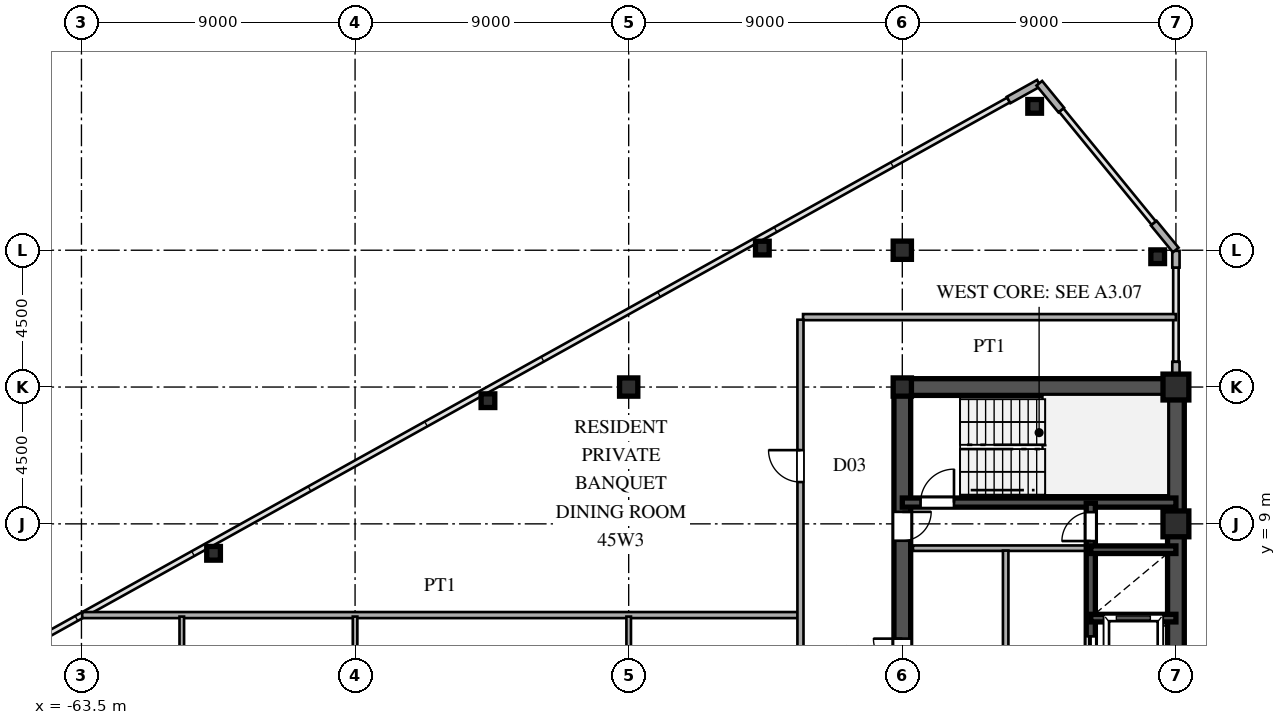
"""IFC4 building model, lengths in metres.
Left out: names, types, materials, properties, quantities, classifications, styles, units other than length and angle.
Written with IfcOpenShell. Run it as: python <this file> out.ifc"""

import sys

from ifc_helpers import new_model, si_unit, direction, frame, frame_2d, origin, origin_2d, place, context, subcontext, project, spatial, rectangle, hollow_rectangle, i_section, extrude, source, transform, mapped, element, fill, save


model = new_model("IFC4")
c1 = context("Model", 3, precision=1e-05, world=origin(), true_north=direction((0.0, 1.0)))
c2 = subcontext(c1, "Body", "Model", "MODEL_VIEW")
j1 = project(units=[si_unit("LENGTHUNIT", "METRE"), si_unit("PLANEANGLEUNIT", "RADIAN")], contexts=[c1])
p1 = place(None, origin())
s1 = spatial("IfcSite", under=j1, at=p1, CompositionType="ELEMENT")
p2 = place(p1, origin())
s2 = spatial("IfcBuilding", under=s1, at=p2, CompositionType="ELEMENT")
p3 = place(p2, frame((0.0, 0.0, 170.7)))
s3 = spatial("IfcBuildingStorey", under=s2, at=p3, CompositionType="ELEMENT", Elevation=170.7)
m1 = source(origin(), c2, "Body", "SweptSolid", [
    extrude(hollow_rectangle(XDim=0.85, YDim=0.85, WallThickness=0.036, at=origin_2d()), origin(), (0.0, 0.0, 1.0), 3.6),
])
for number, where, z_axis, x_axis in (
    (1, (-27.5, 9.0, 0.0), (0.0, 0.0, 1.0), (1.0, 0.0, 0.0)),
    (2, (-27.5, 13.5, 0.0), (0.0, 0.0, 1.0), (1.0, 0.0, 0.0)),
):
    element("IfcColumn", number, at=place(p3, frame(where, z_axis=z_axis, x_axis=x_axis)), inside=s3, PredefinedType="COLUMN", context=c2, shape_type="MappedRepresentation", body=[
        mapped(m1, transform((0.0, 0.0, 0.0), scale=1.0)),
    ])
m2 = source(origin(), c2, "Body", "SweptSolid", [
    extrude(i_section(OverallWidth=0.6, OverallDepth=0.6, WebThickness=0.025, FlangeThickness=0.04, at=origin_2d()), origin(), (0.0, 0.0, 1.0), 3.6),
])
for number, where, z_axis, x_axis in (
    (3, (-36.5, 13.5, 0.0), (0.0, 0.0, 1.0), (1.0, 0.0, 0.0)),
    (4, (-36.5, 18.0, 0.0), (0.0, 0.0, 1.0), (1.0, 0.0, 0.0)),
    (5, (-45.5, 13.5, 0.0), (0.0, 0.0, 1.0), (1.0, 0.0, 0.0)),
):
    element("IfcColumn", number, at=place(p3, frame(where, z_axis=z_axis, x_axis=x_axis)), inside=s3, PredefinedType="COLUMN", context=c2, shape_type="MappedRepresentation", body=[
        mapped(m2, transform((0.0, 0.0, 0.0), scale=1.0)),
    ])
m3 = source(origin(), c2, "Body", "SweptSolid", [
    extrude(hollow_rectangle(XDim=0.45, YDim=0.45, WallThickness=0.018, at=origin_2d()), origin(), (0.0, 0.0, 1.0), 3.6),
])
for number, where, z_axis, x_axis in (
    (6, (-28.1, 17.786, 0.0), (0.0, 0.0, 1.0), (1.0, 0.0, 0.0)),
    (7, (-32.147, 22.732, 0.0), (0.0, 0.0, 1.0), (1.0, 0.0, 0.0)),
    (8, (-41.104, 18.071, 0.0), (0.0, 0.0, 1.0), (1.0, 0.0, 0.0)),
    (9, (-50.129, 13.051, 0.0), (0.0, 0.0, 1.0), (1.0, 0.0, 0.0)),
    (10, (-59.155, 8.031, 0.0), (0.0, 0.0, 1.0), (1.0, 0.0, 0.0)),
):
    element("IfcColumn", number, at=place(p3, frame(where, z_axis=z_axis, x_axis=x_axis)), inside=s3, PredefinedType="COLUMN", context=c2, shape_type="MappedRepresentation", body=[
        mapped(m3, transform((0.0, 0.0, 0.0), scale=1.0)),
    ])
p4 = place(p3, frame((-27.5, 13.78, 0.0), z_axis=(0.0, 0.0, 1.0), x_axis=(0.0, 1.0, 0.0)))
e11 = element("IfcWall", 11, at=p4, inside=s3, PredefinedType="SOLIDWALL", context=c2, shape_type="SweptSolid", body=[
    extrude(rectangle(XDim=0.55, YDim=0.24, at=frame_2d((0.275, 0.0))), origin(), (0.0, 0.0, 1.0), 2.88),
])
p5 = place(p3, frame((-27.5, 17.43, 0.0), z_axis=(0.0, 0.0, 1.0), x_axis=(0.0, 1.0, 0.0)))
e12 = element("IfcWall", 12, at=p5, inside=s3, PredefinedType="SOLIDWALL", context=c2, shape_type="SweptSolid", body=[
    extrude(rectangle(XDim=0.55, YDim=0.24, at=frame_2d((0.275, 0.0))), origin(), (0.0, 0.0, 1.0), 3.38),
])
for number, where, z_axis, x_axis in (
    (13, (-27.506, 18.008, 0.0), (0.0, 0.0, 1.0), (-0.633, 0.774, 0.0)),
    (14, (-31.272, 22.61, 0.0), (0.0, 0.0, 1.0), (-0.633, 0.774, 0.0)),
):
    element("IfcWall", number, at=place(p3, frame(where, z_axis=z_axis, x_axis=x_axis)), inside=s3, PredefinedType="SOLIDWALL", context=c2, shape_type="SweptSolid", body=[
        extrude(rectangle(XDim=1.14, YDim=0.24, at=frame_2d((0.57, 0.0))), origin(), (0.0, 0.0, 1.0), 3.38),
    ])
p6 = place(p3, frame((-32.009, 23.495, 0.0), z_axis=(0.0, 0.0, 1.0), x_axis=(-0.87385402111, -0.486188389196, 0.0)))
e15 = element("IfcWall", 15, at=p6, inside=s3, PredefinedType="SOLIDWALL", context=c2, shape_type="SweptSolid", body=[
    extrude(rectangle(XDim=1.14, YDim=0.24, at=frame_2d((0.57, 0.0))), origin(), (0.0, 0.0, 1.0), 3.38),
])
p7 = place(p3, frame((-27.5, 1.3, 0.0), z_axis=(0.0, 0.0, 1.0), x_axis=(0.0, 1.0, 0.0)))
e16 = element("IfcWall", 16, at=p7, inside=s3, PredefinedType="SHEAR", context=c2, shape_type="SweptSolid", body=[
    extrude(rectangle(XDim=12.2, YDim=0.55, at=frame_2d((6.1, 0.0))), origin(), (0.0, 0.0, 1.0), 3.38),
])
p8 = place(p3, frame((-36.5, 13.5, 0.0), z_axis=(0.0, 0.0, 1.0), x_axis=(1.0, 0.0, 0.0)))
e17 = element("IfcWall", 17, at=p8, inside=s3, PredefinedType="SHEAR", context=c2, shape_type="SweptSolid", body=[
    extrude(rectangle(XDim=9.0, YDim=0.55, at=frame_2d((4.5, 0.0))), origin(), (0.0, 0.0, 1.0), 3.38),
])
p9 = place(p3, frame((-36.5, 8.2, 0.0), z_axis=(0.0, 0.0, 1.0), x_axis=(0.0, 1.0, 0.0)))
e18 = element("IfcWall", 18, at=p9, inside=s3, PredefinedType="SHEAR", context=c2, shape_type="SweptSolid", body=[
    extrude(rectangle(XDim=5.45, YDim=0.55, at=frame_2d((2.725, 0.0))), origin(), (0.0, 0.0, 1.0), 3.38),
])
p10 = place(p9, frame((0.245, 0.0, 0.0)))
e19 = element("IfcOpeningElement", 19, at=p10, cuts=e18, PredefinedType="OPENING", context=c2, shape_type="SweptSolid", body=[
    extrude(rectangle(XDim=0.95, YDim=2.15, at=frame_2d((0.475, 1.075))), frame((0.0, 0.285, 0.0), z_axis=(0.0, -1.0, 0.0), x_axis=(1.0, 0.0, 0.0)), (0.0, 0.0, 1.0), 0.57),
])
p11 = place(p3, frame((-36.5, 1.3, 0.0), z_axis=(0.0, 0.0, 1.0), x_axis=(0.0, 1.0, 0.0)))
e20 = element("IfcWall", 20, at=p11, inside=s3, PredefinedType="SHEAR", context=c2, shape_type="SweptSolid", body=[
    extrude(rectangle(XDim=6.9, YDim=0.55, at=frame_2d((3.45, 0.0))), origin(), (0.0, 0.0, 1.0), 3.38),
])
p12 = place(p11, frame((2.975, 0.0, 0.0)))
e21 = element("IfcOpeningElement", 21, at=p12, cuts=e20, PredefinedType="OPENING", context=c2, shape_type="SweptSolid", body=[
    extrude(rectangle(XDim=0.95, YDim=2.15, at=frame_2d((0.475, 1.075))), frame((0.0, 0.285, 0.0), z_axis=(0.0, -1.0, 0.0), x_axis=(1.0, 0.0, 0.0)), (0.0, 0.0, 1.0), 0.57),
])
p13 = place(p3, frame((-36.5, 9.7, 0.0), z_axis=(0.0, 0.0, 1.0), x_axis=(1.0, 0.0, 0.0)))
e22 = element("IfcWall", 22, at=p13, inside=s3, PredefinedType="SHEAR", context=c2, shape_type="SweptSolid", body=[
    extrude(rectangle(XDim=9.0, YDim=0.3, at=frame_2d((4.5, 0.0))), origin(), (0.0, 0.0, 1.0), 3.38),
])
p14 = place(p13, frame((0.6, 0.0, 0.0)))
e23 = element("IfcOpeningElement", 23, at=p14, cuts=e22, PredefinedType="OPENING", context=c2, shape_type="SweptSolid", body=[
    extrude(rectangle(XDim=1.1, YDim=2.2, at=frame_2d((0.55, 1.1))), frame((0.0, 0.16, 0.0), z_axis=(0.0, -1.0, 0.0), x_axis=(1.0, 0.0, 0.0)), (0.0, 0.0, 1.0), 0.32),
])
for number, where, z_axis, x_axis in (
    (24, (-30.3, 5.9, 0.0), (0.0, 0.0, 1.0), (1.0, 0.0, 0.0)),
    (25, (-30.3, 8.15, 0.0), (0.0, 0.0, 1.0), (1.0, 0.0, 0.0)),
):
    element("IfcWall", number, at=place(p3, frame(where, z_axis=z_axis, x_axis=x_axis)), inside=s3, PredefinedType="SHEAR", context=c2, shape_type="SweptSolid", body=[
        extrude(rectangle(XDim=2.8, YDim=0.25, at=frame_2d((1.4, 0.0))), origin(), (0.0, 0.0, 1.0), 3.38),
    ])
p15 = place(p3, frame((-30.3, 3.6, 0.0), z_axis=(0.0, 0.0, 1.0), x_axis=(0.0, 1.0, 0.0)))
e26 = element("IfcWall", 26, at=p15, inside=s3, PredefinedType="SHEAR", context=c2, shape_type="SweptSolid", body=[
    extrude(rectangle(XDim=2.3, YDim=0.3, at=frame_2d((1.15, 0.0))), origin(), (0.0, 0.0, 1.0), 3.38),
])
p16 = place(p15, frame((0.6, 0.0, 0.0)))
e27 = element("IfcOpeningElement", 27, at=p16, cuts=e26, PredefinedType="OPENING", context=c2, shape_type="SweptSolid", body=[
    extrude(rectangle(XDim=1.1, YDim=2.2, at=frame_2d((0.55, 1.1))), frame((0.0, 0.16, 0.0), z_axis=(0.0, -1.0, 0.0), x_axis=(1.0, 0.0, 0.0)), (0.0, 0.0, 1.0), 0.32),
])
p17 = place(p3, frame((-30.3, 5.9, 0.0), z_axis=(0.0, 0.0, 1.0), x_axis=(0.0, 1.0, 0.0)))
e28 = element("IfcWall", 28, at=p17, inside=s3, PredefinedType="SHEAR", context=c2, shape_type="SweptSolid", body=[
    extrude(rectangle(XDim=2.25, YDim=0.3, at=frame_2d((1.125, 0.0))), origin(), (0.0, 0.0, 1.0), 3.38),
])
p18 = place(p3, frame((-30.3, 8.15, 0.0), z_axis=(0.0, 0.0, 1.0), x_axis=(0.0, 1.0, 0.0)))
e29 = element("IfcWall", 29, at=p18, inside=s3, PredefinedType="SHEAR", context=c2, shape_type="SweptSolid", body=[
    extrude(rectangle(XDim=1.53, YDim=0.3, at=frame_2d((0.765, 0.0))), origin(), (0.0, 0.0, 1.0), 3.38),
])
p19 = place(p18, frame((0.285, 0.0, 0.0)))
e30 = element("IfcOpeningElement", 30, at=p19, cuts=e29, PredefinedType="OPENING", context=c2, shape_type="SweptSolid", body=[
    extrude(rectangle(XDim=0.95, YDim=2.15, at=frame_2d((0.475, 1.075))), frame((0.0, 0.16, 0.0), z_axis=(0.0, -1.0, 0.0), x_axis=(1.0, 0.0, 0.0)), (0.0, 0.0, 1.0), 0.32),
])
p20 = place(p3, frame((-36.15, 8.2, 0.0), z_axis=(0.0, 0.0, 1.0), x_axis=(1.0, 0.0, 0.0)))
e31 = element("IfcWall", 31, at=p20, inside=s3, PredefinedType="PARTITIONING", context=c2, shape_type="SweptSolid", body=[
    extrude(rectangle(XDim=5.7, YDim=0.18, at=frame_2d((2.85, 0.0))), origin(), (0.0, 0.0, 1.0), 3.38),
])
p21 = place(p3, frame((-33.1, 1.38, 0.0), z_axis=(0.0, 0.0, 1.0), x_axis=(0.0, 1.0, 0.0)))
e32 = element("IfcWall", 32, at=p21, inside=s3, PredefinedType="PARTITIONING", context=c2, shape_type="SweptSolid", body=[
    extrude(rectangle(XDim=6.74, YDim=0.18, at=frame_2d((3.37, 0.0))), origin(), (0.0, 0.0, 1.0), 3.38),
])
p22 = place(p3, frame((-63.476, 6.0, 0.0), z_axis=(0.0, 0.0, 1.0), x_axis=(1.0, 0.0, 0.0)))
e33 = element("IfcWall", 33, at=p22, inside=s3, PredefinedType="PARTITIONING", context=c2, shape_type="SweptSolid", body=[
    extrude(rectangle(XDim=23.546, YDim=0.2, at=frame_2d((11.773, 0.0))), origin(), (0.0, 0.0, 1.0), 3.38),
])
p23 = place(p3, frame((-39.765, 15.8, 0.0), z_axis=(0.0, 0.0, 1.0), x_axis=(1.0, 0.0, 0.0)))
e34 = element("IfcWall", 34, at=p23, inside=s3, PredefinedType="PARTITIONING", context=c2, shape_type="SweptSolid", body=[
    extrude(rectangle(XDim=12.265, YDim=0.2, at=frame_2d((6.132, 0.0))), origin(), (0.0, 0.0, 1.0), 3.38),
])
p24 = place(p3, frame((-60.2, -3.283, 0.0), z_axis=(0.0, 0.0, 1.0), x_axis=(0.0, 1.0, 0.0)))
e35 = element("IfcWall", 35, at=p24, inside=s3, PredefinedType="PARTITIONING", context=c2, shape_type="SweptSolid", body=[
    extrude(rectangle(XDim=9.233, YDim=0.15, at=frame_2d((4.616, 0.0))), origin(), (0.0, 0.0, 1.0), 3.38),
])
p25 = place(p24, frame((1.808, 0.0, 0.0)))
e36 = element("IfcOpeningElement", 36, at=p25, cuts=e35, PredefinedType="OPENING", context=c2, shape_type="SweptSolid", body=[
    extrude(rectangle(XDim=0.95, YDim=2.15, at=frame_2d((0.475, 1.075))), frame((0.0, 0.085, 0.0), z_axis=(0.0, -1.0, 0.0), x_axis=(1.0, 0.0, 0.0)), (0.0, 0.0, 1.0), 0.17),
])
p26 = place(p24, frame((6.475, 0.0, 0.0)))
e37 = element("IfcOpeningElement", 37, at=p26, cuts=e35, PredefinedType="OPENING", context=c2, shape_type="SweptSolid", body=[
    extrude(rectangle(XDim=0.95, YDim=2.15, at=frame_2d((0.475, 1.075))), frame((0.0, 0.085, 0.0), z_axis=(0.0, -1.0, 0.0), x_axis=(1.0, 0.0, 0.0)), (0.0, 0.0, 1.0), 0.17),
])
p27 = place(p3, frame((-54.5, -7.95, 0.0), z_axis=(0.0, 0.0, 1.0), x_axis=(0.0, 1.0, 0.0)))
e38 = element("IfcWall", 38, at=p27, inside=s3, PredefinedType="PARTITIONING", context=c2, shape_type="SweptSolid", body=[
    extrude(rectangle(XDim=13.9, YDim=0.15, at=frame_2d((6.95, 0.0))), origin(), (0.0, 0.0, 1.0), 2.78),
])
p28 = place(p27, frame((6.475, 0.0, 0.0)))
e39 = element("IfcOpeningElement", 39, at=p28, cuts=e38, PredefinedType="OPENING", context=c2, shape_type="SweptSolid", body=[
    extrude(rectangle(XDim=0.95, YDim=2.15, at=frame_2d((0.475, 1.075))), frame((0.0, 0.085, 0.0), z_axis=(0.0, -1.0, 0.0), x_axis=(1.0, 0.0, 0.0)), (0.0, 0.0, 1.0), 0.17),
])
p29 = place(p3, frame((-45.5, 1.852, 0.0), z_axis=(0.0, 0.0, 1.0), x_axis=(0.0, 1.0, 0.0)))
e40 = element("IfcWall", 40, at=p29, inside=s3, PredefinedType="PARTITIONING", context=c2, shape_type="SweptSolid", body=[
    extrude(rectangle(XDim=4.098, YDim=0.15, at=frame_2d((2.049, 0.0))), origin(), (0.0, 0.0, 1.0), 2.78),
])
p30 = place(p3, frame((-39.85, -15.715, 0.0), z_axis=(0.0, 0.0, 1.0), x_axis=(0.0, 1.0, 0.0)))
e41 = element("IfcWall", 41, at=p30, inside=s3, PredefinedType="PARTITIONING", context=c2, shape_type="SweptSolid", body=[
    extrude(rectangle(XDim=31.43, YDim=0.2, at=frame_2d((15.715, 0.0))), origin(), (0.0, 0.0, 1.0), 3.38),
])
p31 = place(p30, frame((3.29, 0.0, 0.0)))
e42 = element("IfcOpeningElement", 42, at=p31, cuts=e41, PredefinedType="OPENING", context=c2, shape_type="SweptSolid", body=[
    extrude(rectangle(XDim=1.05, YDim=2.25, at=frame_2d((0.525, 1.125))), frame((0.0, 0.11, 0.0), z_axis=(0.0, -1.0, 0.0), x_axis=(1.0, 0.0, 0.0)), (0.0, 0.0, 1.0), 0.22),
])
p32 = place(p30, frame((13.98, 0.0, 0.0)))
e43 = element("IfcOpeningElement", 43, at=p32, cuts=e41, PredefinedType="OPENING", context=c2, shape_type="SweptSolid", body=[
    extrude(rectangle(XDim=1.05, YDim=2.25, at=frame_2d((0.525, 1.125))), frame((0.0, 0.11, 0.0), z_axis=(0.0, -1.0, 0.0), x_axis=(1.0, 0.0, 0.0)), (0.0, 0.0, 1.0), 0.22),
])
p33 = place(p30, frame((26.09, 0.0, 0.0)))
e44 = element("IfcOpeningElement", 44, at=p33, cuts=e41, PredefinedType="OPENING", context=c2, shape_type="SweptSolid", body=[
    extrude(rectangle(XDim=1.05, YDim=2.25, at=frame_2d((0.525, 1.125))), frame((0.0, 0.11, 0.0), z_axis=(0.0, -1.0, 0.0), x_axis=(1.0, 0.0, 0.0)), (0.0, 0.0, 1.0), 0.22),
])
m4 = source(origin(), c2, "Body", "SweptSolid", [
    extrude(rectangle(XDim=0.95, YDim=2.15, at=frame_2d((0.475, 1.075))), frame((0.0, 0.025, 0.0), z_axis=(0.0, -1.0, 0.0), x_axis=(1.0, 0.0, 0.0)), (0.0, 0.0, 1.0), 0.05),
])
p34 = place(p10, frame((0.95, 0.0, 0.0), z_axis=(0.0, 0.0, 1.0), x_axis=(-1.0, 0.0, 0.0)))
e45 = element("IfcDoor", 45, at=p34, inside=s3, OperationType="SINGLE_SWING_RIGHT", PredefinedType="DOOR", context=c2, shape_type="MappedRepresentation", body=[
    mapped(m4, transform((0.0, 0.0, 0.0), scale=1.0)),
])
fill(e19, e45)
p35 = place(p12, origin())
e46 = element("IfcDoor", 46, at=p35, inside=s3, OperationType="SINGLE_SWING_RIGHT", PredefinedType="DOOR", context=c2, shape_type="MappedRepresentation", body=[
    mapped(m4, transform((0.0, 0.0, 0.0), scale=1.0)),
])
fill(e21, e46)
m5 = source(origin(), c2, "Body", "SweptSolid", [
    extrude(rectangle(XDim=1.1, YDim=2.2, at=frame_2d((0.55, 1.1))), frame((0.0, 0.025, 0.0), z_axis=(0.0, -1.0, 0.0), x_axis=(1.0, 0.0, 0.0)), (0.0, 0.0, 1.0), 0.05),
])
p36 = place(p14, origin())
e47 = element("IfcDoor", 47, at=p36, inside=s3, OperationType="SINGLE_SWING_RIGHT", PredefinedType="DOOR", context=c2, shape_type="MappedRepresentation", body=[
    mapped(m5, transform((0.0, 0.0, 0.0), scale=1.0)),
])
fill(e23, e47)
m6 = source(origin(), c2, "Body", "SweptSolid", [
    extrude(rectangle(XDim=1.1, YDim=2.2, at=frame_2d((0.55, 1.1))), frame((0.0, 0.025, 0.0), z_axis=(0.0, -1.0, 0.0), x_axis=(1.0, 0.0, 0.0)), (0.0, 0.0, 1.0), 0.05),
])
p37 = place(p16, origin())
e48 = element("IfcDoor", 48, at=p37, inside=s3, OperationType="DOUBLE_DOOR_SLIDING", PredefinedType="DOOR", context=c2, shape_type="MappedRepresentation", body=[
    mapped(m6, transform((0.0, 0.0, 0.0), scale=1.0)),
])
fill(e27, e48)
p38 = place(p19, origin())
e49 = element("IfcDoor", 49, at=p38, inside=s3, OperationType="SINGLE_SWING_LEFT", PredefinedType="DOOR", context=c2, shape_type="MappedRepresentation", body=[
    mapped(m4, transform((0.0, 0.0, 0.0), scale=1.0)),
])
fill(e30, e49)
m7 = source(origin(), c2, "Body", "SweptSolid", [
    extrude(rectangle(XDim=1.05, YDim=2.25, at=frame_2d((0.525, 1.125))), frame((0.0, 0.025, 0.0), z_axis=(0.0, -1.0, 0.0), x_axis=(1.0, 0.0, 0.0)), (0.0, 0.0, 1.0), 0.05),
])
p39 = place(p33, origin())
e50 = element("IfcDoor", 50, at=p39, inside=s3, OperationType="SINGLE_SWING_RIGHT", PredefinedType="DOOR", context=c2, shape_type="MappedRepresentation", body=[
    mapped(m7, transform((0.0, 0.0, 0.0), scale=1.0)),
])
fill(e44, e50)
save(model, sys.argv[1])
